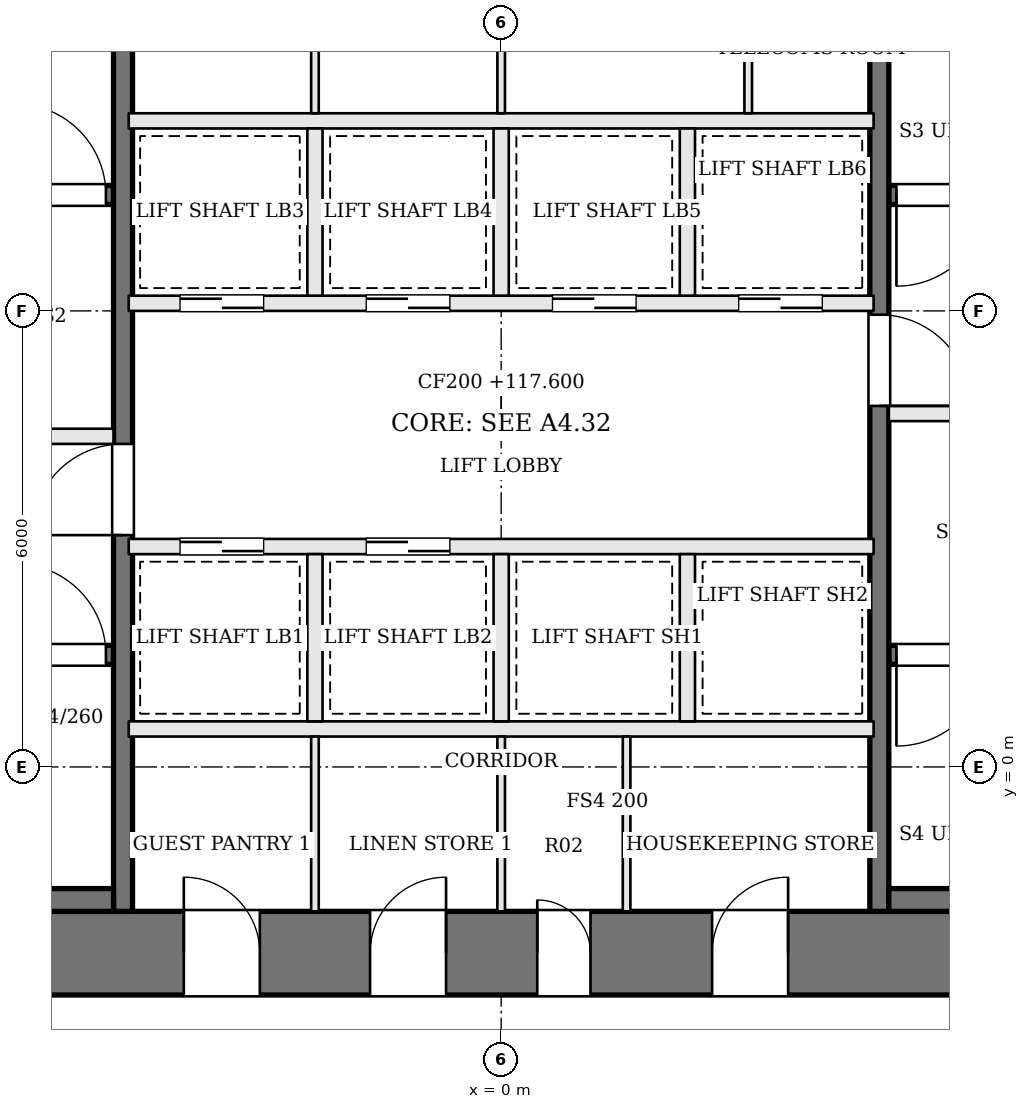
"""IFC4 building model, lengths in metres.
Left out: names, types, materials, properties, quantities, classifications, styles, units other than length and angle.
Written with IfcOpenShell. Run it as: python <this file> out.ifc"""

import sys

from ifc_helpers import new_model, si_unit, direction, frame, frame_2d, origin, place, context, subcontext, project, spatial, rectangle, extrude, element, fill, save


model = new_model("IFC4")
c1 = context("Model", 3, precision=1e-05, world=origin(), true_north=direction((0.0, 1.0)))
c2 = subcontext(c1, "Body", "Model", "MODEL_VIEW")
j1 = project(units=[si_unit("LENGTHUNIT", "METRE"), si_unit("PLANEANGLEUNIT", "RADIAN")], contexts=[c1])
p1 = place(None, origin())
s1 = spatial("IfcSite", under=j1, at=p1, CompositionType="ELEMENT")
p2 = place(p1, origin())
s2 = spatial("IfcBuilding", under=s1, at=p2, CompositionType="ELEMENT")
p3 = place(p2, frame((0.0, 0.0, 117.6)))
s3 = spatial("IfcBuildingStorey", under=s2, at=p3, CompositionType="ELEMENT", Elevation=117.6)
p4 = place(p3, frame((-13.0, -2.45, 0.0), z_axis=(0.0, 0.0, 1.0), x_axis=(1.0, 0.0, 0.0)))
e1 = element("IfcWall", 1, at=p4, inside=s3, PredefinedType="SHEAR", context=c2, shape_type="SweptSolid", body=[
    extrude(rectangle(XDim=26.0, YDim=1.1, at=frame_2d((13.0, 0.0))), origin(), (0.0, 0.0, 1.0), 3.6),
])
p5 = place(p4, frame((8.825, 0.0, 0.0)))
e2 = element("IfcOpeningElement", 2, at=p5, cuts=e1, PredefinedType="OPENING", context=c2, shape_type="SweptSolid", body=[
    extrude(rectangle(XDim=1.0, YDim=2.1, at=frame_2d((0.5, 1.05))), frame((0.0, 0.56, 0.0), z_axis=(0.0, -1.0, 0.0), x_axis=(1.0, 0.0, 0.0)), (0.0, 0.0, 1.0), 1.12),
])
p6 = place(p4, frame((11.275, 0.0, 0.0)))
e3 = element("IfcOpeningElement", 3, at=p6, cuts=e1, PredefinedType="OPENING", context=c2, shape_type="SweptSolid", body=[
    extrude(rectangle(XDim=1.0, YDim=2.1, at=frame_2d((0.5, 1.05))), frame((0.0, 0.56, 0.0), z_axis=(0.0, -1.0, 0.0), x_axis=(1.0, 0.0, 0.0)), (0.0, 0.0, 1.0), 1.12),
])
p7 = place(p4, frame((13.475, 0.0, 0.0)))
e4 = element("IfcOpeningElement", 4, at=p7, cuts=e1, PredefinedType="OPENING", context=c2, shape_type="SweptSolid", body=[
    extrude(rectangle(XDim=0.7, YDim=2.1, at=frame_2d((0.35, 1.05))), frame((0.0, 0.56, 0.0), z_axis=(0.0, -1.0, 0.0), x_axis=(1.0, 0.0, 0.0)), (0.0, 0.0, 1.0), 1.12),
])
p8 = place(p4, frame((15.775, 0.0, 0.0)))
e5 = element("IfcOpeningElement", 5, at=p8, cuts=e1, PredefinedType="OPENING", context=c2, shape_type="SweptSolid", body=[
    extrude(rectangle(XDim=1.0, YDim=2.1, at=frame_2d((0.5, 1.05))), frame((0.0, 0.56, 0.0), z_axis=(0.0, -1.0, 0.0), x_axis=(1.0, 0.0, 0.0)), (0.0, 0.0, 1.0), 1.12),
])
p9 = place(p3, frame((-11.9, 1.475, 0.0), z_axis=(0.0, 0.0, 1.0), x_axis=(1.0, 0.0, 0.0)))
e6 = element("IfcWall", 6, at=p9, inside=s3, PredefinedType="SOLIDWALL", context=c2, shape_type="SweptSolid", body=[
    extrude(rectangle(XDim=6.8, YDim=0.25, at=frame_2d((3.4, 0.0))), origin(), (0.0, 0.0, 1.0), 3.3),
])
p10 = place(p9, frame((5.5, 0.0, 0.0)))
e7 = element("IfcOpeningElement", 7, at=p10, cuts=e6, PredefinedType="OPENING", context=c2, shape_type="SweptSolid", body=[
    extrude(rectangle(XDim=1.2, YDim=2.1, at=frame_2d((0.6, 1.05))), frame((0.0, 0.135, 0.0), z_axis=(0.0, -1.0, 0.0), x_axis=(1.0, 0.0, 0.0)), (0.0, 0.0, 1.0), 0.27),
])
p11 = place(p3, frame((11.9, 7.525, 0.0), z_axis=(0.0, 0.0, 1.0), x_axis=(-1.0, 0.0, 0.0)))
e8 = element("IfcWall", 8, at=p11, inside=s3, PredefinedType="SOLIDWALL", context=c2, shape_type="SweptSolid", body=[
    extrude(rectangle(XDim=6.8, YDim=0.25, at=frame_2d((3.4, 0.0))), origin(), (0.0, 0.0, 1.0), 3.3),
])
p12 = place(p11, frame((5.5, 0.0, 0.0)))
e9 = element("IfcOpeningElement", 9, at=p12, cuts=e8, PredefinedType="OPENING", context=c2, shape_type="SweptSolid", body=[
    extrude(rectangle(XDim=1.2, YDim=2.1, at=frame_2d((0.6, 1.05))), frame((0.0, 0.135, 0.0), z_axis=(0.0, -1.0, 0.0), x_axis=(1.0, 0.0, 0.0)), (0.0, 0.0, 1.0), 0.27),
])
p13 = place(p3, frame((-11.9, 4.35, 0.0), z_axis=(0.0, 0.0, 1.0), x_axis=(1.0, 0.0, 0.0)))
e10 = element("IfcWall", 10, at=p13, inside=s3, PredefinedType="SOLIDWALL", context=c2, shape_type="SweptSolid", body=[
    extrude(rectangle(XDim=6.8, YDim=0.2, at=frame_2d((3.4, 0.0))), origin(), (0.0, 0.0, 1.0), 3.3),
])
p14 = place(p13, frame((4.1, 0.0, 0.0)))
e11 = element("IfcOpeningElement", 11, at=p14, cuts=e10, PredefinedType="OPENING", context=c2, shape_type="SweptSolid", body=[
    extrude(rectangle(XDim=1.2, YDim=2.1, at=frame_2d((0.6, 1.05))), frame((0.0, 0.11, 0.0), z_axis=(0.0, -1.0, 0.0), x_axis=(1.0, 0.0, 0.0)), (0.0, 0.0, 1.0), 0.22),
])
p15 = place(p13, frame((0.8, 0.0, 0.0)))
e12 = element("IfcOpeningElement", 12, at=p15, cuts=e10, PredefinedType="OPENING", context=c2, shape_type="SweptSolid", body=[
    extrude(rectangle(XDim=1.2, YDim=2.1, at=frame_2d((0.6, 1.05))), frame((0.0, 0.11, 0.0), z_axis=(0.0, -1.0, 0.0), x_axis=(1.0, 0.0, 0.0)), (0.0, 0.0, 1.0), 0.22),
])
p16 = place(p3, frame((11.9, 4.65, 0.0), z_axis=(0.0, 0.0, 1.0), x_axis=(-1.0, 0.0, 0.0)))
e13 = element("IfcWall", 13, at=p16, inside=s3, PredefinedType="SOLIDWALL", context=c2, shape_type="SweptSolid", body=[
    extrude(rectangle(XDim=6.8, YDim=0.2, at=frame_2d((3.4, 0.0))), origin(), (0.0, 0.0, 1.0), 3.3),
])
p17 = place(p16, frame((4.1, 0.0, 0.0)))
e14 = element("IfcOpeningElement", 14, at=p17, cuts=e13, PredefinedType="OPENING", context=c2, shape_type="SweptSolid", body=[
    extrude(rectangle(XDim=1.2, YDim=2.1, at=frame_2d((0.6, 1.05))), frame((0.0, 0.11, 0.0), z_axis=(0.0, -1.0, 0.0), x_axis=(1.0, 0.0, 0.0)), (0.0, 0.0, 1.0), 0.22),
])
p18 = place(p16, frame((0.8, 0.0, 0.0)))
e15 = element("IfcOpeningElement", 15, at=p18, cuts=e13, PredefinedType="OPENING", context=c2, shape_type="SweptSolid", body=[
    extrude(rectangle(XDim=1.2, YDim=2.1, at=frame_2d((0.6, 1.05))), frame((0.0, 0.11, 0.0), z_axis=(0.0, -1.0, 0.0), x_axis=(1.0, 0.0, 0.0)), (0.0, 0.0, 1.0), 0.22),
])
p19 = place(p3, frame((-11.9, 7.525, 0.0), z_axis=(0.0, 0.0, 1.0), x_axis=(1.0, 0.0, 0.0)))
e16 = element("IfcWall", 16, at=p19, inside=s3, PredefinedType="SOLIDWALL", context=c2, shape_type="SweptSolid", body=[
    extrude(rectangle(XDim=6.8, YDim=0.25, at=frame_2d((3.4, 0.0))), origin(), (0.0, 0.0, 1.0), 3.3),
])
p20 = place(p19, frame((5.5, 0.0, 0.0)))
e17 = element("IfcOpeningElement", 17, at=p20, cuts=e16, PredefinedType="OPENING", context=c2, shape_type="SweptSolid", body=[
    extrude(rectangle(XDim=1.2, YDim=2.1, at=frame_2d((0.6, 1.05))), frame((0.0, 0.135, 0.0), z_axis=(0.0, -1.0, 0.0), x_axis=(1.0, 0.0, 0.0)), (0.0, 0.0, 1.0), 0.27),
])
p21 = place(p3, frame((11.9, 1.475, 0.0), z_axis=(0.0, 0.0, 1.0), x_axis=(-1.0, 0.0, 0.0)))
e18 = element("IfcWall", 18, at=p21, inside=s3, PredefinedType="SOLIDWALL", context=c2, shape_type="SweptSolid", body=[
    extrude(rectangle(XDim=6.8, YDim=0.25, at=frame_2d((3.4, 0.0))), origin(), (0.0, 0.0, 1.0), 3.3),
])
p22 = place(p21, frame((5.5, 0.0, 0.0)))
e19 = element("IfcOpeningElement", 19, at=p22, cuts=e18, PredefinedType="OPENING", context=c2, shape_type="SweptSolid", body=[
    extrude(rectangle(XDim=1.2, YDim=2.1, at=frame_2d((0.6, 1.05))), frame((0.0, 0.135, 0.0), z_axis=(0.0, -1.0, 0.0), x_axis=(1.0, 0.0, 0.0)), (0.0, 0.0, 1.0), 0.27),
])
p23 = place(p3, frame((-4.975, -1.9, 0.0), z_axis=(0.0, 0.0, 1.0), x_axis=(0.0, 1.0, 0.0)))
e20 = element("IfcWall", 20, at=p23, inside=s3, PredefinedType="SOLIDWALL", context=c2, shape_type="SweptSolid", body=[
    extrude(rectangle(XDim=12.8, YDim=0.25, at=frame_2d((6.4, 0.0))), origin(), (0.0, 0.0, 1.0), 3.3),
])
p24 = place(p23, frame((4.95, 0.0, 0.0)))
e21 = element("IfcOpeningElement", 21, at=p24, cuts=e20, PredefinedType="OPENING", context=c2, shape_type="SweptSolid", body=[
    extrude(rectangle(XDim=1.2, YDim=2.1, at=frame_2d((0.6, 1.05))), frame((0.0, 0.135, 0.0), z_axis=(0.0, -1.0, 0.0), x_axis=(1.0, 0.0, 0.0)), (0.0, 0.0, 1.0), 0.27),
])
p25 = place(p3, frame((4.975, 10.9, 0.0), z_axis=(0.0, 0.0, 1.0), x_axis=(0.0, -1.0, 0.0)))
e22 = element("IfcWall", 22, at=p25, inside=s3, PredefinedType="SOLIDWALL", context=c2, shape_type="SweptSolid", body=[
    extrude(rectangle(XDim=12.8, YDim=0.25, at=frame_2d((6.4, 0.0))), origin(), (0.0, 0.0, 1.0), 3.3),
])
p26 = place(p25, frame((4.95, 0.0, 0.0)))
e23 = element("IfcOpeningElement", 23, at=p26, cuts=e22, PredefinedType="OPENING", context=c2, shape_type="SweptSolid", body=[
    extrude(rectangle(XDim=1.2, YDim=2.1, at=frame_2d((0.6, 1.05))), frame((0.0, 0.135, 0.0), z_axis=(0.0, -1.0, 0.0), x_axis=(1.0, 0.0, 0.0)), (0.0, 0.0, 1.0), 0.27),
])
for number, where, z_axis, x_axis in (
    (24, (-11.9, -1.75, 0.0), (0.0, 0.0, 1.0), (1.0, 0.0, 0.0)),
    (25, (11.9, -1.75, 0.0), (0.0, 0.0, 1.0), (-1.0, 0.0, 0.0)),
):
    element("IfcWall", number, at=place(p3, frame(where, z_axis=z_axis, x_axis=x_axis)), inside=s3, PredefinedType="SOLIDWALL", context=c2, shape_type="SweptSolid", body=[
        extrude(rectangle(XDim=6.8, YDim=0.3, at=frame_2d((3.4, 0.0))), origin(), (0.0, 0.0, 1.0), 3.3),
    ])
p27 = place(p3, frame((-4.9, 0.5, 0.0), z_axis=(0.0, 0.0, 1.0), x_axis=(1.0, 0.0, 0.0)))
e26 = element("IfcWall", 26, at=p27, inside=s3, PredefinedType="SOLIDWALL", context=c2, shape_type="SweptSolid", body=[
    extrude(rectangle(XDim=9.8, YDim=0.2, at=frame_2d((4.9, 0.0))), origin(), (0.0, 0.0, 1.0), 3.3),
])
p28 = place(p3, frame((-4.9, 2.9, 0.0), z_axis=(0.0, 0.0, 1.0), x_axis=(1.0, 0.0, 0.0)))
e27 = element("IfcWall", 27, at=p28, inside=s3, PredefinedType="SOLIDWALL", context=c2, shape_type="SweptSolid", body=[
    extrude(rectangle(XDim=9.8, YDim=0.2, at=frame_2d((4.9, 0.0))), origin(), (0.0, 0.0, 1.0), 3.3),
])
p29 = place(p28, frame((0.675, 0.0, 0.0)))
e28 = element("IfcOpeningElement", 28, at=p29, cuts=e27, PredefinedType="OPENING", context=c2, shape_type="SweptSolid", body=[
    extrude(rectangle(XDim=1.1, YDim=2.1, at=frame_2d((0.55, 1.05))), frame((0.0, 0.11, 0.0), z_axis=(0.0, -1.0, 0.0), x_axis=(1.0, 0.0, 0.0)), (0.0, 0.0, 1.0), 0.22),
])
p30 = place(p28, frame((3.125, 0.0, 0.0)))
e29 = element("IfcOpeningElement", 29, at=p30, cuts=e27, PredefinedType="OPENING", context=c2, shape_type="SweptSolid", body=[
    extrude(rectangle(XDim=1.1, YDim=2.1, at=frame_2d((0.55, 1.05))), frame((0.0, 0.11, 0.0), z_axis=(0.0, -1.0, 0.0), x_axis=(1.0, 0.0, 0.0)), (0.0, 0.0, 1.0), 0.22),
])
p31 = place(p3, frame((-4.9, 6.1, 0.0), z_axis=(0.0, 0.0, 1.0), x_axis=(1.0, 0.0, 0.0)))
e30 = element("IfcWall", 30, at=p31, inside=s3, PredefinedType="SOLIDWALL", context=c2, shape_type="SweptSolid", body=[
    extrude(rectangle(XDim=9.8, YDim=0.2, at=frame_2d((4.9, 0.0))), origin(), (0.0, 0.0, 1.0), 3.3),
])
p32 = place(p31, frame((0.675, 0.0, 0.0)))
e31 = element("IfcOpeningElement", 31, at=p32, cuts=e30, PredefinedType="OPENING", context=c2, shape_type="SweptSolid", body=[
    extrude(rectangle(XDim=1.1, YDim=2.1, at=frame_2d((0.55, 1.05))), frame((0.0, 0.11, 0.0), z_axis=(0.0, -1.0, 0.0), x_axis=(1.0, 0.0, 0.0)), (0.0, 0.0, 1.0), 0.22),
])
p33 = place(p31, frame((3.125, 0.0, 0.0)))
e32 = element("IfcOpeningElement", 32, at=p33, cuts=e30, PredefinedType="OPENING", context=c2, shape_type="SweptSolid", body=[
    extrude(rectangle(XDim=1.1, YDim=2.1, at=frame_2d((0.55, 1.05))), frame((0.0, 0.11, 0.0), z_axis=(0.0, -1.0, 0.0), x_axis=(1.0, 0.0, 0.0)), (0.0, 0.0, 1.0), 0.22),
])
p34 = place(p31, frame((5.575, 0.0, 0.0)))
e33 = element("IfcOpeningElement", 33, at=p34, cuts=e30, PredefinedType="OPENING", context=c2, shape_type="SweptSolid", body=[
    extrude(rectangle(XDim=1.1, YDim=2.1, at=frame_2d((0.55, 1.05))), frame((0.0, 0.11, 0.0), z_axis=(0.0, -1.0, 0.0), x_axis=(1.0, 0.0, 0.0)), (0.0, 0.0, 1.0), 0.22),
])
p35 = place(p31, frame((8.025, 0.0, 0.0)))
e34 = element("IfcOpeningElement", 34, at=p35, cuts=e30, PredefinedType="OPENING", context=c2, shape_type="SweptSolid", body=[
    extrude(rectangle(XDim=1.1, YDim=2.1, at=frame_2d((0.55, 1.05))), frame((0.0, 0.11, 0.0), z_axis=(0.0, -1.0, 0.0), x_axis=(1.0, 0.0, 0.0)), (0.0, 0.0, 1.0), 0.22),
])
p36 = place(p3, frame((-4.9, 8.5, 0.0), z_axis=(0.0, 0.0, 1.0), x_axis=(1.0, 0.0, 0.0)))
e35 = element("IfcWall", 35, at=p36, inside=s3, PredefinedType="SOLIDWALL", context=c2, shape_type="SweptSolid", body=[
    extrude(rectangle(XDim=9.8, YDim=0.2, at=frame_2d((4.9, 0.0))), origin(), (0.0, 0.0, 1.0), 3.3),
])
for number, where, z_axis, x_axis in (
    (36, (-2.45, 0.6, 0.0), (0.0, 0.0, 1.0), (0.0, 1.0, 0.0)),
    (37, (0.0, 0.6, 0.0), (0.0, 0.0, 1.0), (0.0, 1.0, 0.0)),
    (38, (2.45, 0.6, 0.0), (0.0, 0.0, 1.0), (0.0, 1.0, 0.0)),
    (39, (-2.45, 6.2, 0.0), (0.0, 0.0, 1.0), (0.0, 1.0, 0.0)),
    (40, (0.0, 6.2, 0.0), (0.0, 0.0, 1.0), (0.0, 1.0, 0.0)),
    (41, (2.45, 6.2, 0.0), (0.0, 0.0, 1.0), (0.0, 1.0, 0.0)),
):
    element("IfcWall", number, at=place(p3, frame(where, z_axis=z_axis, x_axis=x_axis)), inside=s3, PredefinedType="SOLIDWALL", context=c2, shape_type="SweptSolid", body=[
        extrude(rectangle(XDim=2.2, YDim=0.2, at=frame_2d((1.1, 0.0))), origin(), (0.0, 0.0, 1.0), 3.3),
    ])
for number, where, z_axis, x_axis in (
    (42, (-2.45, -1.9, 0.0), (0.0, 0.0, 1.0), (0.0, 1.0, 0.0)),
    (43, (0.0, -1.9, 0.0), (0.0, 0.0, 1.0), (0.0, 1.0, 0.0)),
    (44, (1.65, -1.9, 0.0), (0.0, 0.0, 1.0), (0.0, 1.0, 0.0)),
    (45, (-2.45, 8.6, 0.0), (0.0, 0.0, 1.0), (0.0, 1.0, 0.0)),
    (46, (0.0, 8.6, 0.0), (0.0, 0.0, 1.0), (0.0, 1.0, 0.0)),
    (47, (3.25, 8.6, 0.0), (0.0, 0.0, 1.0), (0.0, 1.0, 0.0)),
):
    element("IfcWall", number, at=place(p3, frame(where, z_axis=z_axis, x_axis=x_axis)), inside=s3, PredefinedType="PARTITIONING", context=c2, shape_type="SweptSolid", body=[
        extrude(rectangle(XDim=2.3, YDim=0.1, at=frame_2d((1.15, 0.0))), origin(), (0.0, 0.0, 1.0), 3.3),
    ])
p37 = place(p24, origin())
e48 = element("IfcDoor", 48, at=p37, inside=s3, OperationType="SINGLE_SWING_LEFT", PredefinedType="DOOR", context=c2, shape_type="SweptSolid", body=[
    extrude(rectangle(XDim=1.2, YDim=2.1, at=frame_2d((0.6, 1.05))), frame((0.0, 0.025, 0.0), z_axis=(0.0, -1.0, 0.0), x_axis=(1.0, 0.0, 0.0)), (0.0, 0.0, 1.0), 0.05),
])
fill(e21, e48)
p38 = place(p26, origin())
e49 = element("IfcDoor", 49, at=p38, inside=s3, OperationType="SINGLE_SWING_RIGHT", PredefinedType="DOOR", context=c2, shape_type="SweptSolid", body=[
    extrude(rectangle(XDim=1.2, YDim=2.1, at=frame_2d((0.6, 1.05))), frame((0.0, 0.025, 0.0), z_axis=(0.0, -1.0, 0.0), x_axis=(1.0, 0.0, 0.0)), (0.0, 0.0, 1.0), 0.05),
])
fill(e23, e49)
p39 = place(p10, origin())
e50 = element("IfcDoor", 50, at=p39, inside=s3, OperationType="SINGLE_SWING_LEFT", PredefinedType="DOOR", context=c2, shape_type="SweptSolid", body=[
    extrude(rectangle(XDim=1.2, YDim=2.1, at=frame_2d((0.6, 1.05))), frame((0.0, 0.025, 0.0), z_axis=(0.0, -1.0, 0.0), x_axis=(1.0, 0.0, 0.0)), (0.0, 0.0, 1.0), 0.05),
])
fill(e7, e50)
p40 = place(p12, origin())
e51 = element("IfcDoor", 51, at=p40, inside=s3, OperationType="SINGLE_SWING_RIGHT", PredefinedType="DOOR", context=c2, shape_type="SweptSolid", body=[
    extrude(rectangle(XDim=1.2, YDim=2.1, at=frame_2d((0.6, 1.05))), frame((0.0, 0.025, 0.0), z_axis=(0.0, -1.0, 0.0), x_axis=(1.0, 0.0, 0.0)), (0.0, 0.0, 1.0), 0.05),
])
fill(e9, e51)
p41 = place(p20, origin())
e52 = element("IfcDoor", 52, at=p41, inside=s3, OperationType="SINGLE_SWING_LEFT", PredefinedType="DOOR", context=c2, shape_type="SweptSolid", body=[
    extrude(rectangle(XDim=1.2, YDim=2.1, at=frame_2d((0.6, 1.05))), frame((0.0, 0.025, 0.0), z_axis=(0.0, -1.0, 0.0), x_axis=(1.0, 0.0, 0.0)), (0.0, 0.0, 1.0), 0.05),
])
fill(e17, e52)
p42 = place(p22, origin())
e53 = element("IfcDoor", 53, at=p42, inside=s3, OperationType="SINGLE_SWING_RIGHT", PredefinedType="DOOR", context=c2, shape_type="SweptSolid", body=[
    extrude(rectangle(XDim=1.2, YDim=2.1, at=frame_2d((0.6, 1.05))), frame((0.0, 0.025, 0.0), z_axis=(0.0, -1.0, 0.0), x_axis=(1.0, 0.0, 0.0)), (0.0, 0.0, 1.0), 0.05),
])
fill(e19, e53)
p43 = place(p29, origin())
e54 = element("IfcDoor", 54, at=p43, inside=s3, OperationType="SLIDING_TO_RIGHT", PredefinedType="DOOR", context=c2, shape_type="SweptSolid", body=[
    extrude(rectangle(XDim=1.1, YDim=2.1, at=frame_2d((0.55, 1.05))), frame((0.0, 0.025, 0.0), z_axis=(0.0, -1.0, 0.0), x_axis=(1.0, 0.0, 0.0)), (0.0, 0.0, 1.0), 0.05),
])
fill(e28, e54)
p44 = place(p30, origin())
e55 = element("IfcDoor", 55, at=p44, inside=s3, OperationType="SLIDING_TO_LEFT", PredefinedType="DOOR", context=c2, shape_type="SweptSolid", body=[
    extrude(rectangle(XDim=1.1, YDim=2.1, at=frame_2d((0.55, 1.05))), frame((0.0, 0.025, 0.0), z_axis=(0.0, -1.0, 0.0), x_axis=(1.0, 0.0, 0.0)), (0.0, 0.0, 1.0), 0.05),
])
fill(e29, e55)
p45 = place(p32, origin())
e56 = element("IfcDoor", 56, at=p45, inside=s3, OperationType="SLIDING_TO_RIGHT", PredefinedType="DOOR", context=c2, shape_type="SweptSolid", body=[
    extrude(rectangle(XDim=1.1, YDim=2.1, at=frame_2d((0.55, 1.05))), frame((0.0, 0.025, 0.0), z_axis=(0.0, -1.0, 0.0), x_axis=(1.0, 0.0, 0.0)), (0.0, 0.0, 1.0), 0.05),
])
fill(e31, e56)
p46 = place(p33, origin())
e57 = element("IfcDoor", 57, at=p46, inside=s3, OperationType="SLIDING_TO_LEFT", PredefinedType="DOOR", context=c2, shape_type="SweptSolid", body=[
    extrude(rectangle(XDim=1.1, YDim=2.1, at=frame_2d((0.55, 1.05))), frame((0.0, 0.025, 0.0), z_axis=(0.0, -1.0, 0.0), x_axis=(1.0, 0.0, 0.0)), (0.0, 0.0, 1.0), 0.05),
])
fill(e32, e57)
p47 = place(p34, origin())
e58 = element("IfcDoor", 58, at=p47, inside=s3, OperationType="SLIDING_TO_RIGHT", PredefinedType="DOOR", context=c2, shape_type="SweptSolid", body=[
    extrude(rectangle(XDim=1.1, YDim=2.1, at=frame_2d((0.55, 1.05))), frame((0.0, 0.025, 0.0), z_axis=(0.0, -1.0, 0.0), x_axis=(1.0, 0.0, 0.0)), (0.0, 0.0, 1.0), 0.05),
])
fill(e33, e58)
p48 = place(p35, origin())
e59 = element("IfcDoor", 59, at=p48, inside=s3, OperationType="SLIDING_TO_LEFT", PredefinedType="DOOR", context=c2, shape_type="SweptSolid", body=[
    extrude(rectangle(XDim=1.1, YDim=2.1, at=frame_2d((0.55, 1.05))), frame((0.0, 0.025, 0.0), z_axis=(0.0, -1.0, 0.0), x_axis=(1.0, 0.0, 0.0)), (0.0, 0.0, 1.0), 0.05),
])
fill(e34, e59)
p49 = place(p5, origin())
e60 = element("IfcDoor", 60, at=p49, inside=s3, OperationType="SINGLE_SWING_LEFT", PredefinedType="DOOR", context=c2, shape_type="SweptSolid", body=[
    extrude(rectangle(XDim=1.0, YDim=2.1, at=frame_2d((0.5, 1.05))), frame((0.0, 0.025, 0.0), z_axis=(0.0, -1.0, 0.0), x_axis=(1.0, 0.0, 0.0)), (0.0, 0.0, 1.0), 0.05),
])
fill(e2, e60)
p50 = place(p6, origin())
e61 = element("IfcDoor", 61, at=p50, inside=s3, OperationType="SINGLE_SWING_RIGHT", PredefinedType="DOOR", context=c2, shape_type="SweptSolid", body=[
    extrude(rectangle(XDim=1.0, YDim=2.1, at=frame_2d((0.5, 1.05))), frame((0.0, 0.025, 0.0), z_axis=(0.0, -1.0, 0.0), x_axis=(1.0, 0.0, 0.0)), (0.0, 0.0, 1.0), 0.05),
])
fill(e3, e61)
p51 = place(p7, origin())
e62 = element("IfcDoor", 62, at=p51, inside=s3, OperationType="SINGLE_SWING_LEFT", PredefinedType="DOOR", context=c2, shape_type="SweptSolid", body=[
    extrude(rectangle(XDim=0.7, YDim=2.1, at=frame_2d((0.35, 1.05))), frame((0.0, 0.025, 0.0), z_axis=(0.0, -1.0, 0.0), x_axis=(1.0, 0.0, 0.0)), (0.0, 0.0, 1.0), 0.05),
])
fill(e4, e62)
p52 = place(p8, origin())
e63 = element("IfcDoor", 63, at=p52, inside=s3, OperationType="SINGLE_SWING_RIGHT", PredefinedType="DOOR", context=c2, shape_type="SweptSolid", body=[
    extrude(rectangle(XDim=1.0, YDim=2.1, at=frame_2d((0.5, 1.05))), frame((0.0, 0.025, 0.0), z_axis=(0.0, -1.0, 0.0), x_axis=(1.0, 0.0, 0.0)), (0.0, 0.0, 1.0), 0.05),
])
fill(e5, e63)
save(model, sys.argv[1])
